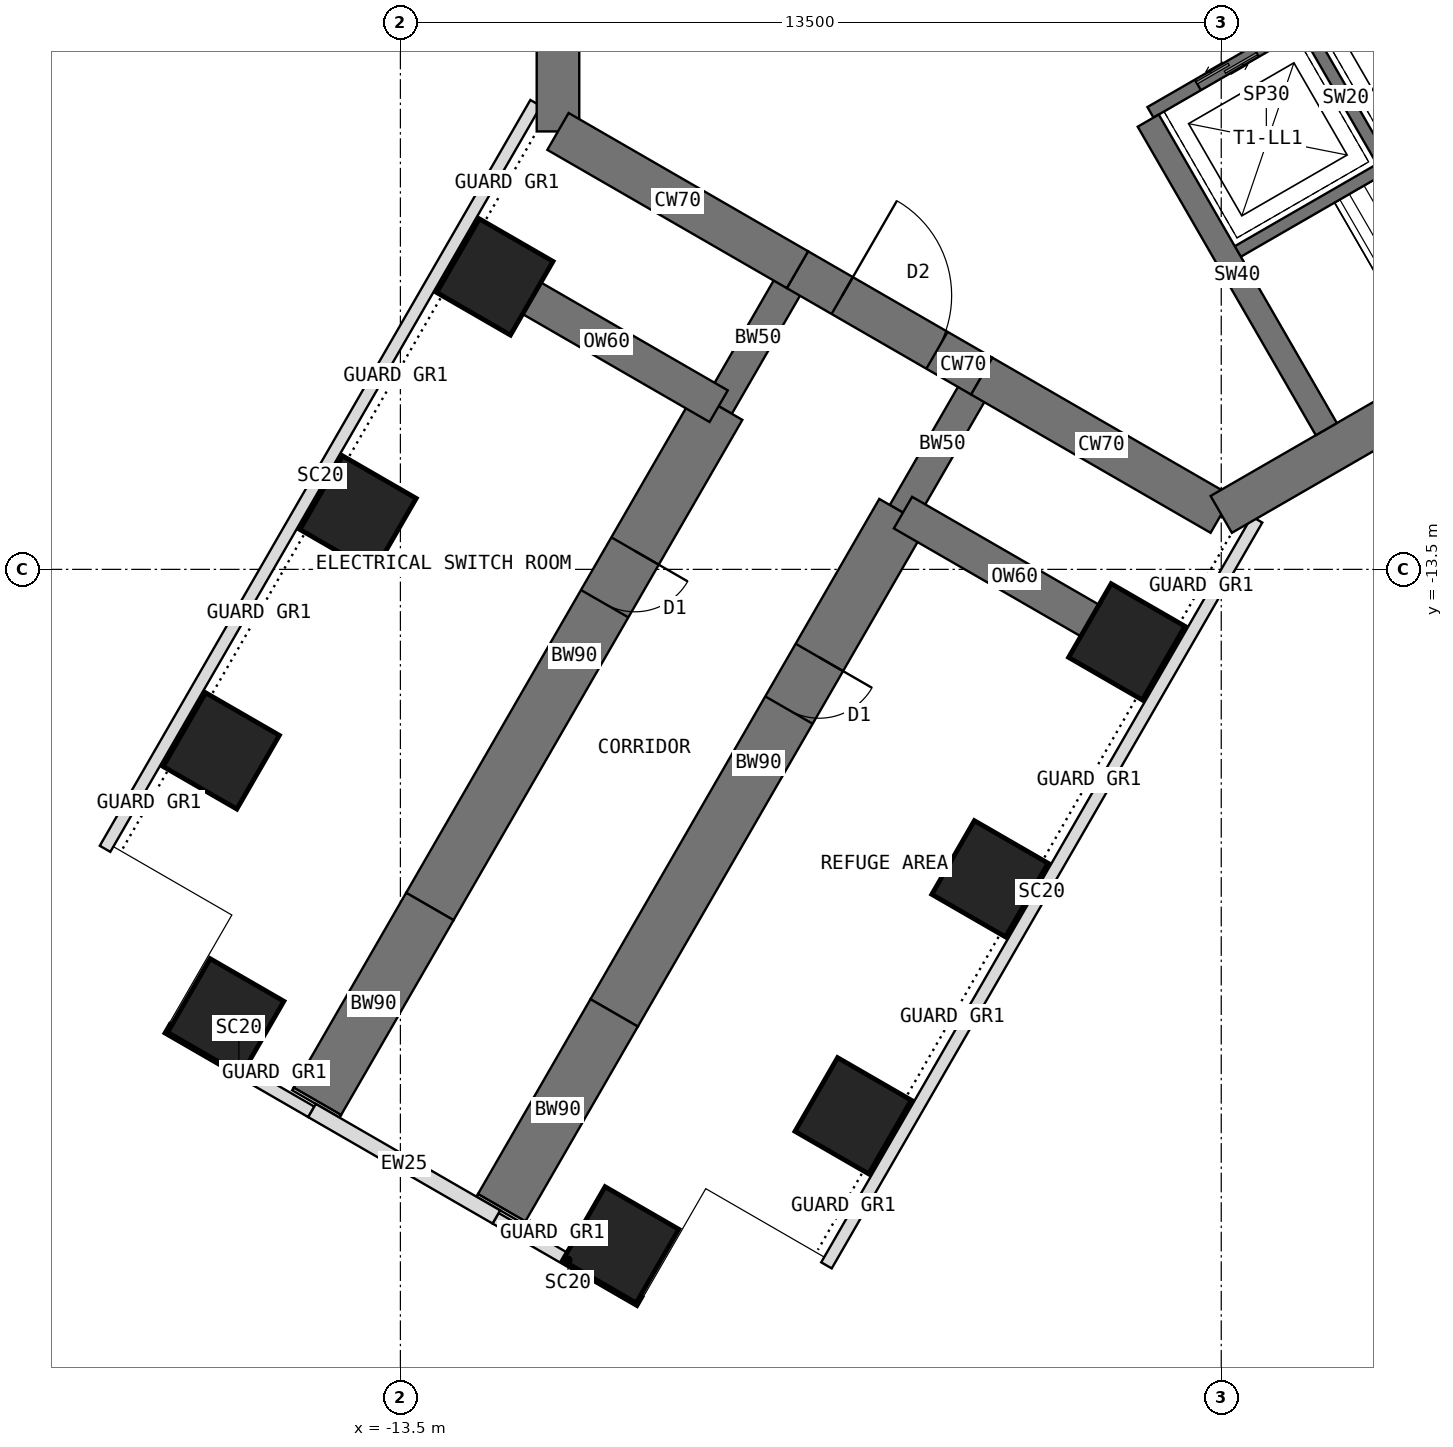
"""IFC4 building model, lengths in metres.
Left out: names, types, materials, properties, quantities, classifications, styles, units other than length and angle.
Written with IfcOpenShell. Run it as: python <this file> out.ifc"""

import sys

from ifc_helpers import new_model, si_unit, direction, frame, frame_2d, origin, origin_2d, place, context, subcontext, project, spatial, rectangle, extrude, element, fill, save


model = new_model("IFC4")
c1 = context("Model", 3, precision=1e-05, world=origin(), true_north=direction((0.0, 1.0)))
c2 = subcontext(c1, "Body", "Model", "MODEL_VIEW")
j1 = project(units=[si_unit("LENGTHUNIT", "METRE"), si_unit("PLANEANGLEUNIT", "RADIAN")], contexts=[c1])
p1 = place(None, origin())
s1 = spatial("IfcSite", under=j1, at=p1, CompositionType="ELEMENT")
p2 = place(p1, origin())
s2 = spatial("IfcBuilding", under=s1, at=p2, CompositionType="ELEMENT")
p3 = place(p2, frame((0.0, 0.0, 92.5)))
s3 = spatial("IfcBuildingStorey", under=s2, at=p3, CompositionType="ELEMENT", Elevation=92.5)
p4 = place(p3, frame((-10.908, 6.298, 0.0), z_axis=(0.0, 0.0, 1.0), x_axis=(0.0, -1.0, 0.0)))
e1 = element("IfcWall", 1, at=p4, inside=s3, PredefinedType="SHEAR", context=c2, shape_type="SweptSolid", body=[
    extrude(rectangle(XDim=12.596, YDim=0.7, at=frame_2d((6.298, 0.0))), origin(), (0.0, 0.0, 1.0), 5.0),
])
p5 = place(p3, frame((-10.908, -6.298, 0.0), z_axis=(0.0, 0.0, 1.0), x_axis=(0.866034513004, -0.499984222037, 0.0)))
e2 = element("IfcWall", 2, at=p5, inside=s3, PredefinedType="SHEAR", context=c2, shape_type="SweptSolid", body=[
    extrude(rectangle(XDim=4.548, YDim=0.7, at=frame_2d((2.274, 0.0))), origin(), (0.0, 0.0, 1.0), 5.0),
])
p6 = place(p3, frame((-6.97, -8.572, 0.0), z_axis=(0.0, 0.0, 1.0), x_axis=(0.866019471182, -0.500010275428, 0.0)))
e3 = element("IfcWall", 3, at=p6, inside=s3, PredefinedType="SHEAR", context=c2, shape_type="SweptSolid", body=[
    extrude(rectangle(XDim=3.5, YDim=0.7, at=frame_2d((1.75, 0.0))), origin(), (0.0, 0.0, 1.0), 5.0),
])
p7 = place(p6, frame((0.85, 0.0, 0.0)))
e4 = element("IfcOpeningElement", 4, at=p7, cuts=e3, PredefinedType="OPENING", context=c2, shape_type="SweptSolid", body=[
    extrude(rectangle(XDim=1.8, YDim=2.1, at=frame_2d((0.9, 1.05))), frame((0.0, 0.36, 0.0), z_axis=(0.0, -1.0, 0.0), x_axis=(1.0, 0.0, 0.0)), (0.0, 0.0, 1.0), 0.72),
])
p8 = place(p3, frame((-3.939, -10.322, 0.0), z_axis=(0.0, 0.0, 1.0), x_axis=(0.866011268655, -0.500024481964, 0.0)))
e5 = element("IfcWall", 5, at=p8, inside=s3, PredefinedType="SHEAR", context=c2, shape_type="SweptSolid", body=[
    extrude(rectangle(XDim=4.548, YDim=0.7, at=frame_2d((2.274, 0.0))), origin(), (0.0, 0.0, 1.0), 5.0),
])
p9 = place(p3, frame((0.0, -12.596, 0.0), z_axis=(0.0, 0.0, 1.0), x_axis=(0.866021940709, 0.500005998175, 0.0)))
e6 = element("IfcWall", 6, at=p9, inside=s3, PredefinedType="SHEAR", context=c2, shape_type="SweptSolid", body=[
    extrude(rectangle(XDim=12.596, YDim=0.7, at=frame_2d((6.298, 0.0))), origin(), (0.0, 0.0, 1.0), 5.0),
])
p10 = place(p3, frame((-3.939, -10.322, 0.0), z_axis=(0.0, 0.0, 1.0), x_axis=(-0.499918158782, -0.866072649678, 0.0)))
e7 = element("IfcWall", 7, at=p10, inside=s3, PredefinedType="SHEAR", context=c2, shape_type="SweptSolid", body=[
    extrude(rectangle(XDim=2.592, YDim=0.5, at=frame_2d((1.296, 0.0))), origin(), (0.0, 0.0, 1.0), 5.0),
])
p11 = place(p3, frame((-5.234, -12.566, 0.0), z_axis=(0.0, 0.0, 1.0), x_axis=(-0.499997557548, -0.86602681393, 0.0)))
e8 = element("IfcWall", 8, at=p11, inside=s3, PredefinedType="SHEAR", context=c2, shape_type="SweptSolid", body=[
    extrude(rectangle(XDim=9.5, YDim=0.9, at=frame_2d((4.75, 0.0))), origin(), (0.0, 0.0, 1.0), 5.0),
])
p12 = place(p11, frame((2.75, 0.0, 0.0)))
e9 = element("IfcOpeningElement", 9, at=p12, cuts=e8, PredefinedType="OPENING", context=c2, shape_type="SweptSolid", body=[
    extrude(rectangle(XDim=1.0, YDim=2.1, at=frame_2d((0.5, 1.05))), frame((0.0, 0.46, 0.0), z_axis=(0.0, -1.0, 0.0), x_axis=(1.0, 0.0, 0.0)), (0.0, 0.0, 1.0), 0.92),
])
p13 = place(p3, frame((-9.984, -20.794, 0.0), z_axis=(0.0, 0.0, 1.0), x_axis=(-0.500042316284, -0.866000971088, 0.0)))
e10 = element("IfcWall", 10, at=p13, inside=s3, PredefinedType="SHEAR", context=c2, shape_type="SweptSolid", body=[
    extrude(rectangle(XDim=3.7, YDim=0.9, at=frame_2d((1.85, 0.0))), origin(), (0.0, 0.0, 1.0), 5.0),
])
p14 = place(p3, frame((-6.97, -8.572, 0.0), z_axis=(0.0, 0.0, 1.0), x_axis=(-0.499988811324, -0.866031863473, 0.0)))
e11 = element("IfcWall", 11, at=p14, inside=s3, PredefinedType="SHEAR", context=c2, shape_type="SweptSolid", body=[
    extrude(rectangle(XDim=2.592, YDim=0.5, at=frame_2d((1.296, 0.0))), origin(), (0.0, 0.0, 1.0), 5.0),
])
p15 = place(p3, frame((-8.266, -10.816, 0.0), z_axis=(0.0, 0.0, 1.0), x_axis=(-0.499997557548, -0.86602681393, 0.0)))
e12 = element("IfcWall", 12, at=p15, inside=s3, PredefinedType="SHEAR", context=c2, shape_type="SweptSolid", body=[
    extrude(rectangle(XDim=9.5, YDim=0.9, at=frame_2d((4.75, 0.0))), origin(), (0.0, 0.0, 1.0), 5.0),
])
p16 = place(p15, frame((2.75, 0.0, 0.0)))
e13 = element("IfcOpeningElement", 13, at=p16, cuts=e12, PredefinedType="OPENING", context=c2, shape_type="SweptSolid", body=[
    extrude(rectangle(XDim=1.0, YDim=2.1, at=frame_2d((0.5, 1.05))), frame((0.0, 0.46, 0.0), z_axis=(0.0, -1.0, 0.0), x_axis=(1.0, 0.0, 0.0)), (0.0, 0.0, 1.0), 0.92),
])
p17 = place(p3, frame((-13.016, -19.044, 0.0), z_axis=(0.0, 0.0, 1.0), x_axis=(-0.499992827086, -0.866029545028, 0.0)))
e14 = element("IfcWall", 14, at=p17, inside=s3, PredefinedType="SHEAR", context=c2, shape_type="SweptSolid", body=[
    extrude(rectangle(XDim=3.7, YDim=0.9, at=frame_2d((1.85, 0.0))), origin(), (0.0, 0.0, 1.0), 5.0),
])
for number, where, z_axis, x_axis in (
    (15, (-1.554, -14.691, 0.0), (0.0, 0.0, 1.0), (0.5, 0.866, 0.0)),
    (16, (-11.946, -8.691, 0.0), (0.0, 0.0, 1.0), (0.5, 0.866, 0.0)),
    (17, (-3.804, -18.588, 0.0), (0.0, 0.0, 1.0), (0.5, 0.866, 0.0)),
    (18, (-14.196, -12.588, 0.0), (0.0, 0.0, 1.0), (0.5, 0.866, 0.0)),
    (19, (-6.054, -22.486, 0.0), (0.0, 0.0, 1.0), (0.5, 0.866, 0.0)),
    (20, (-16.446, -16.486, 0.0), (0.0, 0.0, 1.0), (0.5, 0.866, 0.0)),
    (21, (-9.877, -24.608, 0.0), (0.0, 0.0, 1.0), (0.5, 0.866, 0.0)),
    (22, (-16.373, -20.858, 0.0), (0.0, 0.0, 1.0), (0.5, 0.866, 0.0)),
):
    element("IfcColumn", number, at=place(p3, frame(where, z_axis=z_axis, x_axis=x_axis)), inside=s3, PredefinedType="COLUMN", context=c2, shape_type="SweptSolid", body=[
        extrude(rectangle(XDim=1.4, YDim=1.4, at=origin_2d()), origin(), (0.0, 0.0, 1.0), 5.0),
    ])
for number, where, z_axis, x_axis in (
    (23, (-5.234, -12.566, 0.0), (0.0, 0.0, 1.0), (0.866, -0.5, 0.0)),
    (24, (-8.266, -10.816, 0.0), (0.0, 0.0, 1.0), (-0.866, 0.5, 0.0)),
):
    element("IfcWall", number, at=place(p3, frame(where, z_axis=z_axis, x_axis=x_axis)), inside=s3, PredefinedType="SHEAR", context=c2, shape_type="SweptSolid", body=[
        extrude(rectangle(XDim=4.25, YDim=0.6, at=frame_2d((2.125, 0.0))), origin(), (0.0, 0.0, 1.0), 5.0),
    ])
for number, where, z_axis, x_axis in (
    (25, (0.589, -12.68, 0.0), (0.0, 0.0, 1.0), (-0.5, -0.866, 0.0)),
    (26, (-18.357, -18.096, 0.0), (0.0, 0.0, 1.0), (0.5, 0.866, 0.0)),
):
    element("IfcWall", number, at=place(p3, frame(where, z_axis=z_axis, x_axis=x_axis)), inside=s3, PredefinedType="USERDEFINED", context=c2, shape_type="SweptSolid", body=[
        extrude(rectangle(XDim=14.163, YDim=0.2, at=frame_2d((7.082, 0.0))), origin(), (0.0, 0.0, 1.0), 4.8),
    ])
p18 = place(p3, frame((-17.347, -21.046, 0.0), z_axis=(0.0, 0.0, 1.0), x_axis=(0.866027397988, -0.499996545922, 0.0)))
e27 = element("IfcWall", 27, at=p18, inside=s3, PredefinedType="USERDEFINED", context=c2, shape_type="SweptSolid", body=[
    extrude(rectangle(XDim=2.75, YDim=0.2, at=frame_2d((1.375, 0.0))), origin(), (0.0, 0.0, 1.0), 4.8),
])
p19 = place(p3, frame((-14.953, -22.399, 0.0), z_axis=(0.0, 0.0, 1.0), x_axis=(0.866036909293, -0.499980071345, 0.0)))
e28 = element("IfcWall", 28, at=p19, inside=s3, PredefinedType="STANDARD", context=c2, shape_type="SweptSolid", body=[
    extrude(rectangle(XDim=3.5, YDim=0.25, at=frame_2d((1.75, 0.0))), origin(), (0.0, 0.0, 1.0), 4.8),
])
p20 = place(p3, frame((-11.935, -24.171, 0.0), z_axis=(0.0, 0.0, 1.0), x_axis=(0.866027397988, -0.499996545922, 0.0)))
e29 = element("IfcWall", 29, at=p20, inside=s3, PredefinedType="USERDEFINED", context=c2, shape_type="SweptSolid", body=[
    extrude(rectangle(XDim=2.75, YDim=0.2, at=frame_2d((1.375, 0.0))), origin(), (0.0, 0.0, 1.0), 4.8),
])
p21 = place(p3, frame((-11.834, -23.998, 0.0), z_axis=(0.0, 0.0, 1.0), x_axis=(-0.497188445666, -0.867642581652, 0.0)))
e30 = element("IfcWall", 30, at=p21, inside=s3, PredefinedType="PARTITIONING", context=c2, shape_type="SweptSolid", body=[
    extrude(rectangle(XDim=0.05, YDim=0.9, at=frame_2d((0.025, 0.0))), origin(), (0.0, 0.0, 1.0), 4.8),
])
p22 = place(p3, frame((-14.865, -22.248, 0.0), z_axis=(0.0, 0.0, 1.0), x_axis=(-0.500844580232, -0.86553723574, 0.0)))
e31 = element("IfcWall", 31, at=p22, inside=s3, PredefinedType="PARTITIONING", context=c2, shape_type="SweptSolid", body=[
    extrude(rectangle(XDim=0.05, YDim=0.9, at=frame_2d((0.025, 0.0))), origin(), (0.0, 0.0, 1.0), 4.8),
])
p23 = place(p3, frame((-1.164, -5.984, 0.0), z_axis=(0.0, 0.0, 1.0), x_axis=(0.866026010844, 0.49999894854, 0.0)))
e32 = element("IfcWall", 32, at=p23, inside=s3, PredefinedType="SHEAR", context=c2, shape_type="SweptSolid", body=[
    extrude(rectangle(XDim=8.0, YDim=0.2, at=frame_2d((4.0, 0.0))), origin(), (0.0, 0.0, 1.0), 5.0),
])
p24 = place(p23, frame((6.3, 0.0, 0.0)))
e33 = element("IfcOpeningElement", 33, at=p24, cuts=e32, PredefinedType="OPENING", context=c2, shape_type="SweptSolid", body=[
    extrude(rectangle(XDim=1.2, YDim=2.1, at=frame_2d((0.6, 1.05))), frame((0.0, 0.11, 0.0), z_axis=(0.0, -1.0, 0.0), x_axis=(1.0, 0.0, 0.0)), (0.0, 0.0, 1.0), 0.22),
])
p25 = place(p23, frame((0.9, 0.0, 0.0)))
e34 = element("IfcOpeningElement", 34, at=p25, cuts=e32, PredefinedType="OPENING", context=c2, shape_type="SweptSolid", body=[
    extrude(rectangle(XDim=1.1, YDim=2.2, at=frame_2d((0.55, 1.1))), frame((0.0, 0.11, 0.0), z_axis=(0.0, -1.0, 0.0), x_axis=(1.0, 0.0, 0.0)), (0.0, 0.0, 1.0), 0.22),
])
p26 = place(p23, frame((3.8, 0.0, 0.0)))
e35 = element("IfcOpeningElement", 35, at=p26, cuts=e32, PredefinedType="OPENING", context=c2, shape_type="SweptSolid", body=[
    extrude(rectangle(XDim=1.1, YDim=2.2, at=frame_2d((0.55, 1.1))), frame((0.0, 0.11, 0.0), z_axis=(0.0, -1.0, 0.0), x_axis=(1.0, 0.0, 0.0)), (0.0, 0.0, 1.0), 0.22),
])
p27 = place(p3, frame((1.397, -4.62, 0.0), z_axis=(0.0, 0.0, 1.0), x_axis=(0.499936506574, -0.866062058628, 0.0)))
e36 = element("IfcWall", 36, at=p27, inside=s3, PredefinedType="SHEAR", context=c2, shape_type="SweptSolid", body=[
    extrude(rectangle(XDim=2.6, YDim=0.2, at=frame_2d((1.3, 0.0))), origin(), (0.0, 0.0, 1.0), 5.0),
])
p28 = place(p3, frame((0.186, -8.322, 0.0), z_axis=(0.0, 0.0, 1.0), x_axis=(0.866026010844, 0.49999894854, 0.0)))
e37 = element("IfcWall", 37, at=p28, inside=s3, PredefinedType="SHEAR", context=c2, shape_type="SweptSolid", body=[
    extrude(rectangle(XDim=8.0, YDim=0.2, at=frame_2d((4.0, 0.0))), origin(), (0.0, 0.0, 1.0), 5.0),
])
p29 = place(p28, frame((6.7, 0.0, 0.0)))
e38 = element("IfcOpeningElement", 38, at=p29, cuts=e37, PredefinedType="OPENING", context=c2, shape_type="SweptSolid", body=[
    extrude(rectangle(XDim=1.1, YDim=2.1, at=frame_2d((0.55, 1.05))), frame((0.0, 0.11, 0.0), z_axis=(0.0, -1.0, 0.0), x_axis=(1.0, 0.0, 0.0)), (0.0, 0.0, 1.0), 0.22),
])
p30 = place(p3, frame((-1.201, -6.12, 0.0), z_axis=(0.0, 0.0, 1.0), x_axis=(0.500002627198, -0.866023886965, 0.0)))
e39 = element("IfcWall", 39, at=p30, inside=s3, PredefinedType="SHEAR", context=c2, shape_type="SweptSolid", body=[
    extrude(rectangle(XDim=5.858, YDim=0.4, at=frame_2d((2.929, 0.0))), origin(), (0.0, 0.0, 1.0), 5.0),
])
p31 = place(p25, origin())
e40 = element("IfcDoor", 40, at=p31, inside=s3, OperationType="DOUBLE_DOOR_SLIDING", PredefinedType="DOOR", context=c2, shape_type="SweptSolid", body=[
    extrude(rectangle(XDim=1.1, YDim=2.2, at=frame_2d((0.55, 1.1))), frame((0.0, 0.025, 0.0), z_axis=(0.0, -1.0, 0.0), x_axis=(1.0, 0.0, 0.0)), (0.0, 0.0, 1.0), 0.05),
])
fill(e34, e40)
p32 = place(p7, origin())
e41 = element("IfcDoor", 41, at=p32, inside=s3, OperationType="DOUBLE_DOOR_DOUBLE_SWING", PredefinedType="DOOR", context=c2, shape_type="SweptSolid", body=[
    extrude(rectangle(XDim=1.72, YDim=2.06, at=frame_2d((0.9, 1.03))), frame((0.0, 0.025, 0.0), z_axis=(0.0, -1.0, 0.0), x_axis=(1.0, 0.0, 0.0)), (0.0, 0.0, 1.0), 0.05),
    extrude(rectangle(XDim=0.04, YDim=2.1, at=frame_2d((0.02, 1.05))), frame((0.0, 0.35, 0.0), z_axis=(0.0, -1.0, 0.0), x_axis=(1.0, 0.0, 0.0)), (0.0, 0.0, 1.0), 0.699),
    extrude(rectangle(XDim=0.04, YDim=2.1, at=frame_2d((1.78, 1.05))), frame((0.0, 0.35, 0.0), z_axis=(0.0, -1.0, 0.0), x_axis=(1.0, 0.0, 0.0)), (0.0, 0.0, 1.0), 0.699),
    extrude(rectangle(XDim=1.72, YDim=0.04, at=frame_2d((0.9, 2.08))), frame((0.0, 0.35, 0.0), z_axis=(0.0, -1.0, 0.0), x_axis=(1.0, 0.0, 0.0)), (0.0, 0.0, 1.0), 0.699),
])
fill(e4, e41)
p33 = place(p12, origin())
e42 = element("IfcDoor", 42, at=p33, inside=s3, OperationType="SINGLE_SWING_LEFT", PredefinedType="DOOR", context=c2, shape_type="SweptSolid", body=[
    extrude(rectangle(XDim=0.92, YDim=2.06, at=frame_2d((0.5, 1.03))), frame((0.0, 0.025, 0.0), z_axis=(0.0, -1.0, 0.0), x_axis=(1.0, 0.0, 0.0)), (0.0, 0.0, 1.0), 0.05),
    extrude(rectangle(XDim=0.04, YDim=2.1, at=frame_2d((0.02, 1.05))), frame((0.0, 0.45, 0.0), z_axis=(0.0, -1.0, 0.0), x_axis=(1.0, 0.0, 0.0)), (0.0, 0.0, 1.0), 0.899),
    extrude(rectangle(XDim=0.04, YDim=2.1, at=frame_2d((0.98, 1.05))), frame((0.0, 0.45, 0.0), z_axis=(0.0, -1.0, 0.0), x_axis=(1.0, 0.0, 0.0)), (0.0, 0.0, 1.0), 0.899),
    extrude(rectangle(XDim=0.92, YDim=0.04, at=frame_2d((0.5, 2.08))), frame((0.0, 0.45, 0.0), z_axis=(0.0, -1.0, 0.0), x_axis=(1.0, 0.0, 0.0)), (0.0, 0.0, 1.0), 0.899),
])
fill(e9, e42)
p34 = place(p16, origin())
e43 = element("IfcDoor", 43, at=p34, inside=s3, OperationType="SINGLE_SWING_LEFT", PredefinedType="DOOR", context=c2, shape_type="SweptSolid", body=[
    extrude(rectangle(XDim=0.92, YDim=2.06, at=frame_2d((0.5, 1.03))), frame((0.0, 0.025, 0.0), z_axis=(0.0, -1.0, 0.0), x_axis=(1.0, 0.0, 0.0)), (0.0, 0.0, 1.0), 0.05),
    extrude(rectangle(XDim=0.04, YDim=2.1, at=frame_2d((0.02, 1.05))), frame((0.0, 0.45, 0.0), z_axis=(0.0, -1.0, 0.0), x_axis=(1.0, 0.0, 0.0)), (0.0, 0.0, 1.0), 0.899),
    extrude(rectangle(XDim=0.04, YDim=2.1, at=frame_2d((0.98, 1.05))), frame((0.0, 0.45, 0.0), z_axis=(0.0, -1.0, 0.0), x_axis=(1.0, 0.0, 0.0)), (0.0, 0.0, 1.0), 0.899),
    extrude(rectangle(XDim=0.92, YDim=0.04, at=frame_2d((0.5, 2.08))), frame((0.0, 0.45, 0.0), z_axis=(0.0, -1.0, 0.0), x_axis=(1.0, 0.0, 0.0)), (0.0, 0.0, 1.0), 0.899),
])
fill(e13, e43)
save(model, sys.argv[1])
